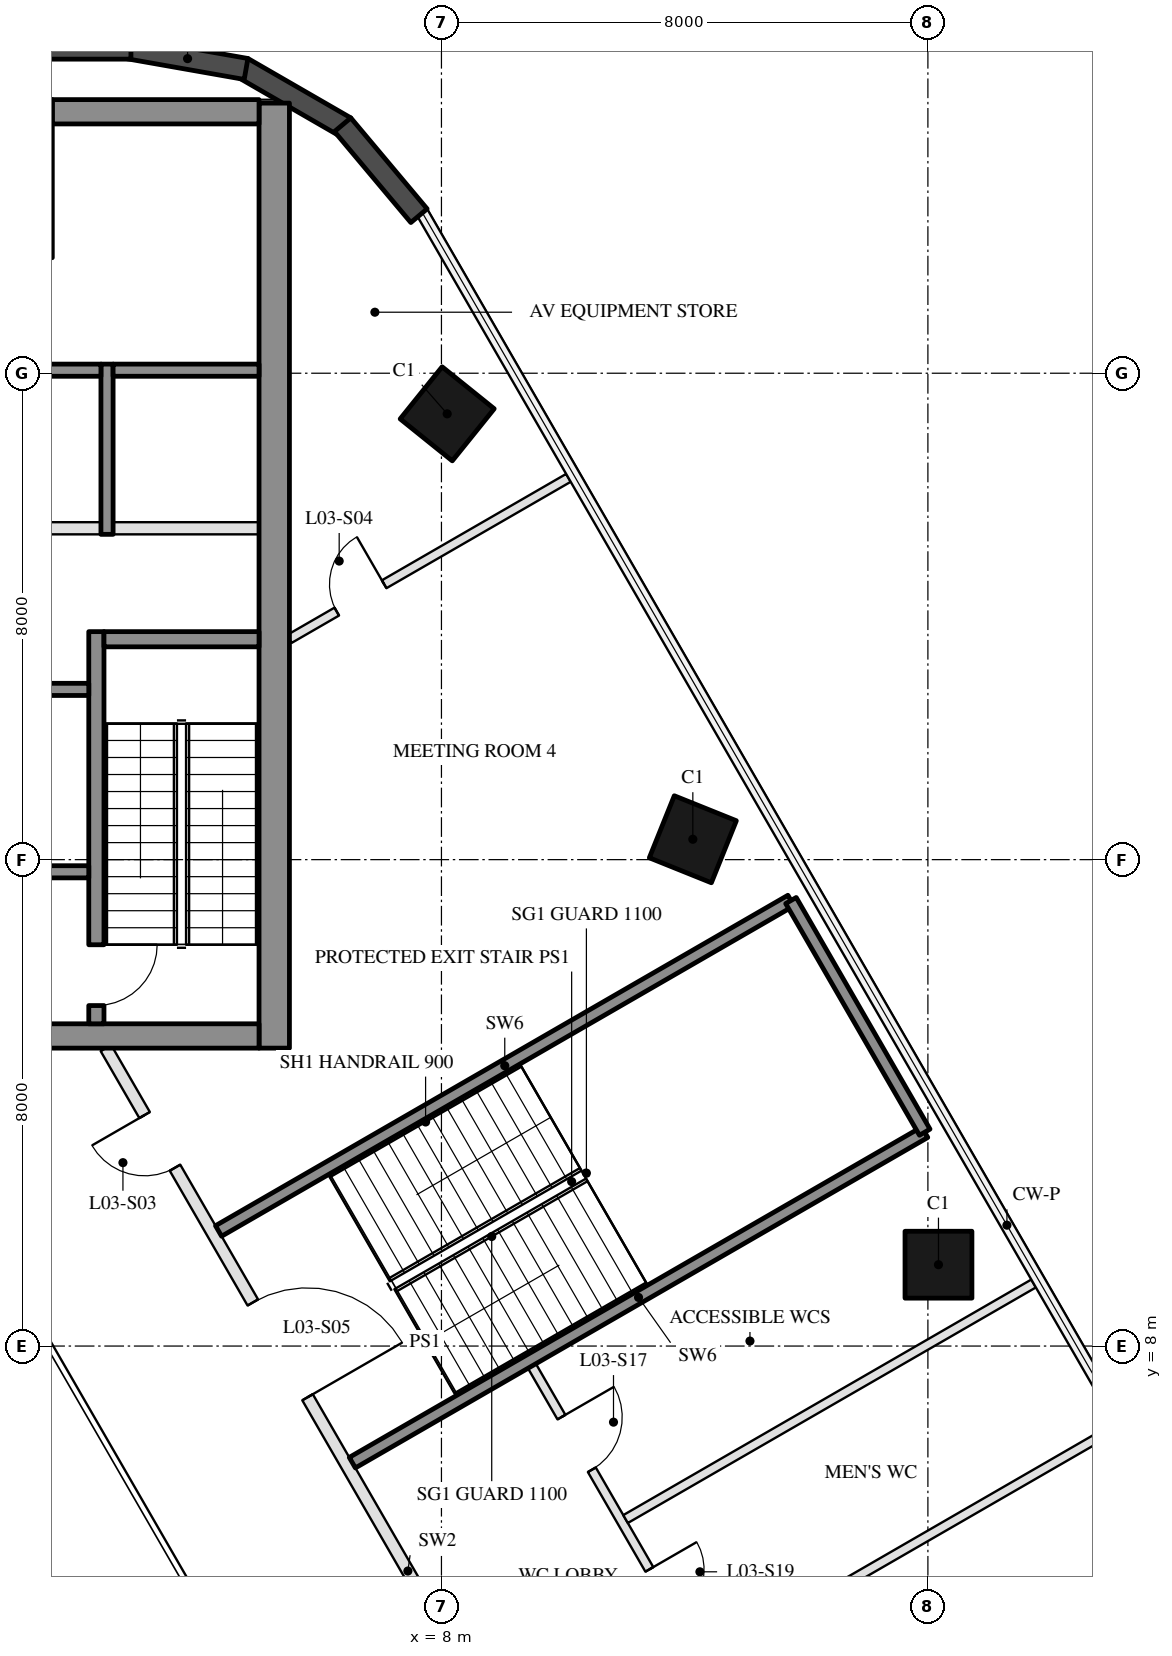
"""IFC4 building model, lengths in metres.
Left out: names, types, materials, properties, quantities, classifications, styles, units other than length and angle.
Written with IfcOpenShell. Run it as: python <this file> out.ifc"""

import sys

from ifc_helpers import new_model, si_unit, direction, frame, frame_2d, origin, origin_2d, place, context, subcontext, project, spatial, rectangle, hollow_rectangle, extrude, boolean, halfspace, element, fill, save


model = new_model("IFC4")
c1 = context("Model", 3, precision=1e-05, world=origin(), true_north=direction((0.0, 1.0)))
c2 = subcontext(c1, "Body", "Model", "MODEL_VIEW")
j1 = project(units=[si_unit("LENGTHUNIT", "METRE"), si_unit("PLANEANGLEUNIT", "RADIAN")], contexts=[c1])
p1 = place(None, origin())
s1 = spatial("IfcSite", under=j1, at=p1, CompositionType="ELEMENT")
p2 = place(p1, origin())
s2 = spatial("IfcBuilding", under=s1, at=p2, CompositionType="ELEMENT")
p3 = place(p2, frame((0.0, 0.0, 23.5)))
s3 = spatial("IfcBuildingStorey", under=s2, at=p3, CompositionType="ELEMENT", Elevation=23.5)
p4 = place(p3, frame((16.174, 9.338, 0.0), z_axis=(-0.045250647617, -0.026087388443, 0.99863498189), x_axis=(0.499528531793, -0.866297435009, 4.558094e-06)))
e1 = element("IfcColumn", 1, at=p4, inside=s3, PredefinedType="COLUMN", context=c2, shape_type="SweptSolid", body=[
    boolean("DIFFERENCE", boolean("DIFFERENCE", extrude(hollow_rectangle(XDim=1.1, YDim=1.1, WallThickness=0.05, at=origin_2d()), origin(), (0.0, 0.0, 1.0), 5.007), halfspace(frame((0.0, 0.0, 0.013), z_axis=(0.0, 0.0, 1.0), x_axis=(1.0, 0.0, 0.0)), True)), halfspace(frame((0.0, 0.0, 4.996), z_axis=(0.0, 0.0, 1.0), x_axis=(1.0, 0.0, 0.0)), False)),
])
p5 = place(p3, frame((12.134, 16.335, 0.0), z_axis=(-0.034759119107, -0.04436297109, 0.998410602125), x_axis=(-0.500316360293, 0.865586931558, 0.021042897599)))
e2 = element("IfcColumn", 2, at=p5, inside=s3, PredefinedType="COLUMN", context=c2, shape_type="SweptSolid", body=[
    boolean("DIFFERENCE", boolean("DIFFERENCE", extrude(hollow_rectangle(XDim=1.1, YDim=1.1, WallThickness=0.05, at=origin_2d()), origin(), (0.0, 0.0, 1.0), 5.008), halfspace(frame((0.0, 0.0, 0.014), z_axis=(0.0, 0.0, 1.0), x_axis=(1.0, 0.0, 0.0)), True)), halfspace(frame((0.0, 0.0, 4.997), z_axis=(0.0, 0.0, 1.0), x_axis=(1.0, 0.0, 0.0)), False)),
])
p6 = place(p3, frame((8.094, 23.332, 0.0), z_axis=(-0.024212996995, -0.062505583791, 0.997750862075), x_axis=(-0.500357699692, 0.864797842793, 0.042034074978)))
e3 = element("IfcColumn", 3, at=p6, inside=s3, PredefinedType="COLUMN", context=c2, shape_type="SweptSolid", body=[
    boolean("DIFFERENCE", boolean("DIFFERENCE", extrude(hollow_rectangle(XDim=1.1, YDim=1.1, WallThickness=0.05, at=origin_2d()), origin(), (0.0, 0.0, 1.0), 5.011), halfspace(frame((0.0, 0.0, 0.017), z_axis=(0.0, 0.0, 1.0), x_axis=(1.0, 0.0, 0.0)), True)), halfspace(frame((0.0, 0.0, 4.999), z_axis=(0.0, 0.0, 1.0), x_axis=(1.0, 0.0, 0.0)), False)),
])
p7 = place(p3, frame((0.0, 27.2, 0.0), z_axis=(0.0, 0.0, 1.0), x_axis=(1.0, 0.0, 0.0)))
e4 = element("IfcColumn", 4, at=p7, inside=s3, PredefinedType="COLUMN", context=c2, shape_type="SweptSolid", body=[
    extrude(hollow_rectangle(XDim=3.2, YDim=2.6, WallThickness=0.08, at=origin_2d()), origin(), (0.0, 0.0, 1.0), 5.0),
])
p8 = place(p3, frame((6.421, 28.048, 0.0), z_axis=(0.0, 0.0, 1.0), x_axis=(-0.866027425724, 0.499996497882, 0.0)))
e5 = element("IfcWall", 5, at=p8, inside=s3, PredefinedType="SOLIDWALL", context=c2, shape_type="SweptSolid", body=[
    extrude(rectangle(XDim=1.954, YDim=0.35, at=frame_2d((0.977, 0.0))), origin(), (0.0, 0.0, 1.0), 4.7),
])
p9 = place(p3, frame((4.787, 29.004, 0.0), z_axis=(0.0, 0.0, 1.0), x_axis=(-0.98479990812, 0.173692662389, 0.0)))
e6 = element("IfcWall", 6, at=p9, inside=s3, PredefinedType="SOLIDWALL", context=c2, shape_type="SweptSolid", body=[
    extrude(rectangle(XDim=1.954, YDim=0.35, at=frame_2d((0.977, 0.0))), origin(), (0.0, 0.0, 1.0), 4.7),
])
p10 = place(p3, frame((2.893, 29.341, 0.0), z_axis=(0.0, 0.0, 1.0), x_axis=(-1.0, 0.0, 0.0)))
e7 = element("IfcWall", 7, at=p10, inside=s3, PredefinedType="SOLIDWALL", context=c2, shape_type="SweptSolid", body=[
    extrude(rectangle(XDim=5.787, YDim=0.35, at=frame_2d((2.893, 0.0))), origin(), (0.0, 0.0, 1.0), 4.7),
])
p11 = place(p3, frame((7.631, 26.591, 0.0), z_axis=(0.0, 0.0, 1.0), x_axis=(-0.642799224464, 0.766034697013, 0.0)))
e8 = element("IfcWall", 8, at=p11, inside=s3, PredefinedType="SOLIDWALL", context=c2, shape_type="SweptSolid", body=[
    extrude(rectangle(XDim=1.953, YDim=0.35, at=frame_2d((0.977, 0.0))), origin(), (0.0, 0.0, 1.0), 4.7),
])
p12 = place(p3, frame((5.25, 12.9, 0.0), z_axis=(0.0, 0.0, 1.0), x_axis=(0.0, 1.0, 0.0)))
e9 = element("IfcWall", 9, at=p12, inside=s3, PredefinedType="SHEAR", context=c2, shape_type="SweptSolid", body=[
    extrude(rectangle(XDim=15.542, YDim=0.5, at=frame_2d((7.771, 0.0))), origin(), (0.0, 0.0, 1.0), 4.7),
])
p13 = place(p3, frame((5.0, 13.1, 0.0), z_axis=(0.0, 0.0, 1.0), x_axis=(-1.0, 0.0, 0.0)))
e10 = element("IfcWall", 10, at=p13, inside=s3, PredefinedType="SHEAR", context=c2, shape_type="SweptSolid", body=[
    extrude(rectangle(XDim=10.0, YDim=0.4, at=frame_2d((5.0, 0.0))), origin(), (0.0, 0.0, 1.0), 4.7),
])
p14 = place(p13, frame((3.55, 0.0, 0.0)))
e11 = element("IfcOpeningElement", 11, at=p14, cuts=e10, PredefinedType="OPENING", context=c2, shape_type="SweptSolid", body=[
    extrude(rectangle(XDim=1.1, YDim=2.1, at=frame_2d((0.55, 1.05))), frame((0.0, 0.21, 0.0), z_axis=(0.0, -1.0, 0.0), x_axis=(1.0, 0.0, 0.0)), (0.0, 0.0, 1.0), 0.42),
])
p15 = place(p13, frame((5.85, 0.0, 0.0)))
e12 = element("IfcOpeningElement", 12, at=p15, cuts=e10, PredefinedType="OPENING", context=c2, shape_type="SweptSolid", body=[
    extrude(rectangle(XDim=1.4, YDim=2.1, at=frame_2d((0.7, 1.05))), frame((0.0, 0.21, 0.0), z_axis=(0.0, -1.0, 0.0), x_axis=(1.0, 0.0, 0.0)), (0.0, 0.0, 1.0), 0.42),
])
p16 = place(p3, frame((5.0, 28.3, 0.0), z_axis=(0.0, 0.0, 1.0), x_axis=(-1.0, 0.0, 0.0)))
e13 = element("IfcWall", 13, at=p16, inside=s3, PredefinedType="SHEAR", context=c2, shape_type="SweptSolid", body=[
    extrude(rectangle(XDim=3.4, YDim=0.4, at=frame_2d((1.7, 0.0))), origin(), (0.0, 0.0, 1.0), 4.7),
])
p17 = place(p3, frame((2.325, 13.3, 0.0), z_axis=(0.0, 0.0, 1.0), x_axis=(0.0, 1.0, 0.0)))
e14 = element("IfcWall", 14, at=p17, inside=s3, PredefinedType="SHEAR", context=c2, shape_type="SweptSolid", body=[
    extrude(rectangle(XDim=6.45, YDim=0.25, at=frame_2d((3.225, 0.0))), origin(), (0.0, 0.0, 1.0), 4.7),
])
p18 = place(p17, frame((0.3, 0.0, 0.0)))
e15 = element("IfcOpeningElement", 15, at=p18, cuts=e14, PredefinedType="OPENING", context=c2, shape_type="SweptSolid", body=[
    extrude(rectangle(XDim=1.0, YDim=2.1, at=frame_2d((0.5, 1.05))), frame((0.0, 0.135, 0.0), z_axis=(0.0, -1.0, 0.0), x_axis=(1.0, 0.0, 0.0)), (0.0, 0.0, 1.0), 0.27),
])
p19 = place(p3, frame((5.0, 19.625, 0.0), z_axis=(0.0, 0.0, 1.0), x_axis=(-1.0, 0.0, 0.0)))
e16 = element("IfcWall", 16, at=p19, inside=s3, PredefinedType="SHEAR", context=c2, shape_type="SweptSolid", body=[
    extrude(rectangle(XDim=2.55, YDim=0.25, at=frame_2d((1.275, 0.0))), origin(), (0.0, 0.0, 1.0), 4.7),
])
p20 = place(p3, frame((2.2, 18.8, 0.0), z_axis=(0.0, 0.0, 1.0), x_axis=(-1.0, 0.0, 0.0)))
e17 = element("IfcWall", 17, at=p20, inside=s3, PredefinedType="SHEAR", context=c2, shape_type="SweptSolid", body=[
    extrude(rectangle(XDim=2.8, YDim=0.2, at=frame_2d((1.4, 0.0))), origin(), (0.0, 0.0, 1.0), 4.7),
])
p21 = place(p3, frame((2.2, 15.8, 0.0), z_axis=(0.0, 0.0, 1.0), x_axis=(-1.0, 0.0, 0.0)))
e18 = element("IfcWall", 18, at=p21, inside=s3, PredefinedType="SHEAR", context=c2, shape_type="SweptSolid", body=[
    extrude(rectangle(XDim=2.8, YDim=0.2, at=frame_2d((1.4, 0.0))), origin(), (0.0, 0.0, 1.0), 4.7),
])
p22 = place(p21, frame((0.7, 0.0, 0.0)))
e19 = element("IfcOpeningElement", 19, at=p22, cuts=e18, PredefinedType="OPENING", context=c2, shape_type="SweptSolid", body=[
    extrude(rectangle(XDim=1.2, YDim=2.1, at=frame_2d((0.6, 1.05))), frame((0.0, 0.11, 0.0), z_axis=(0.0, -1.0, 0.0), x_axis=(1.0, 0.0, 0.0)), (0.0, 0.0, 1.0), 0.22),
])
p23 = place(p3, frame((2.5, 21.35, 0.0), z_axis=(0.0, 0.0, 1.0), x_axis=(0.0, 1.0, 0.0)))
e20 = element("IfcWall", 20, at=p23, inside=s3, PredefinedType="SHEAR", context=c2, shape_type="SweptSolid", body=[
    extrude(rectangle(XDim=2.8, YDim=0.2, at=frame_2d((1.4, 0.0))), origin(), (0.0, 0.0, 1.0), 4.7),
])
p24 = place(p3, frame((5.0, 24.05, 0.0), z_axis=(0.0, 0.0, 1.0), x_axis=(-1.0, 0.0, 0.0)))
e21 = element("IfcWall", 21, at=p24, inside=s3, PredefinedType="SHEAR", context=c2, shape_type="SweptSolid", body=[
    extrude(rectangle(XDim=2.4, YDim=0.2, at=frame_2d((1.2, 0.0))), origin(), (0.0, 0.0, 1.0), 4.7),
])
p25 = place(p3, frame((2.4, 24.05, 0.0), z_axis=(0.0, 0.0, 1.0), x_axis=(-1.0, 0.0, 0.0)))
e22 = element("IfcWall", 22, at=p25, inside=s3, PredefinedType="SHEAR", context=c2, shape_type="SweptSolid", body=[
    extrude(rectangle(XDim=2.8, YDim=0.2, at=frame_2d((1.4, 0.0))), origin(), (0.0, 0.0, 1.0), 4.7),
])
p26 = place(p3, frame((5.0, 21.45, 0.0), z_axis=(0.0, 0.0, 1.0), x_axis=(-1.0, 0.0, 0.0)))
e23 = element("IfcWall", 23, at=p26, inside=s3, PredefinedType="PARTITIONING", context=c2, shape_type="SweptSolid", body=[
    extrude(rectangle(XDim=2.4, YDim=0.2, at=frame_2d((1.2, 0.0))), origin(), (0.0, 0.0, 1.0), 4.7),
])
p27 = place(p3, frame((2.4, 21.45, 0.0), z_axis=(0.0, 0.0, 1.0), x_axis=(-1.0, 0.0, 0.0)))
e24 = element("IfcWall", 24, at=p27, inside=s3, PredefinedType="PARTITIONING", context=c2, shape_type="SweptSolid", body=[
    extrude(rectangle(XDim=2.8, YDim=0.2, at=frame_2d((1.4, 0.0))), origin(), (0.0, 0.0, 1.0), 4.7),
])
p28 = place(p3, frame((13.65, 0.462, 0.0), z_axis=(0.0, 0.0, 1.0), x_axis=(-0.499983926186, 0.866034683806, 0.0)))
e25 = element("IfcWall", 25, at=p28, inside=s3, PredefinedType="PARTITIONING", context=c2, shape_type="SweptSolid", body=[
    extrude(rectangle(XDim=8.325, YDim=0.15, at=frame_2d((4.163, 0.0))), origin(), (0.0, 0.0, 1.0), 3.91),
])
p29 = place(p28, frame((6.354, 0.0, 0.0)))
e26 = element("IfcOpeningElement", 26, at=p29, cuts=e25, PredefinedType="OPENING", context=c2, shape_type="SweptSolid", body=[
    extrude(rectangle(XDim=1.0, YDim=2.1, at=frame_2d((0.5, 1.05))), frame((0.0, 0.085, 0.0), z_axis=(0.0, -1.0, 0.0), x_axis=(1.0, 0.0, 0.0)), (0.0, 0.0, 1.0), 0.17),
])
p30 = place(p28, frame((3.562, 0.0, 0.0)))
e27 = element("IfcOpeningElement", 27, at=p30, cuts=e25, PredefinedType="OPENING", context=c2, shape_type="SweptSolid", body=[
    extrude(rectangle(XDim=0.9, YDim=2.1, at=frame_2d((0.45, 1.05))), frame((0.0, 0.085, 0.0), z_axis=(0.0, -1.0, 0.0), x_axis=(1.0, 0.0, 0.0)), (0.0, 0.0, 1.0), 0.17),
])
p31 = place(p28, frame((0.871, 0.0, 0.0)))
e28 = element("IfcOpeningElement", 28, at=p31, cuts=e25, PredefinedType="OPENING", context=c2, shape_type="SweptSolid", body=[
    extrude(rectangle(XDim=0.9, YDim=2.1, at=frame_2d((0.45, 1.05))), frame((0.0, 0.085, 0.0), z_axis=(0.0, -1.0, 0.0), x_axis=(1.0, 0.0, 0.0)), (0.0, 0.0, 1.0), 0.17),
])
p32 = place(p3, frame((20.463, 4.309, 0.0), z_axis=(0.0, 0.0, 1.0), x_axis=(-0.866020428917, -0.500008616625, 0.0)))
e29 = element("IfcWall", 29, at=p32, inside=s3, PredefinedType="PARTITIONING", context=c2, shape_type="SweptSolid", body=[
    extrude(rectangle(XDim=11.176, YDim=0.15, at=frame_2d((5.588, 0.0))), origin(), (0.0, 0.0, 1.0), 4.1),
])
p33 = place(p3, frame((19.101, 6.669, 0.0), z_axis=(0.0, 0.0, 1.0), x_axis=(-0.866031845665, -0.499988842169, 0.0)))
e30 = element("IfcWall", 30, at=p33, inside=s3, PredefinedType="PARTITIONING", context=c2, shape_type="SweptSolid", body=[
    extrude(rectangle(XDim=7.748, YDim=0.15, at=frame_2d((3.874, 0.0))), origin(), (0.0, 0.0, 1.0), 3.91),
])
p34 = place(p3, frame((17.738, 9.029, 0.0), z_axis=(0.0, 0.0, 1.0), x_axis=(-0.866010323949, -0.500026118132, 0.0)))
e31 = element("IfcWall", 31, at=p34, inside=s3, PredefinedType="PARTITIONING", context=c2, shape_type="SweptSolid", body=[
    extrude(rectangle(XDim=7.748, YDim=0.15, at=frame_2d((3.874, 0.0))), origin(), (0.0, 0.0, 1.0), 4.1),
])
for number, where, z_axis, x_axis in (
    (32, (15.948, 11.517, 0.0), (0.0, 0.0, 1.0), (-0.866, -0.5, 0.0)),
    (33, (13.748, 15.328, 0.0), (0.0, 0.0, 1.0), (-0.866, -0.5, 0.0)),
):
    element("IfcWall", number, at=place(p3, frame(where, z_axis=z_axis, x_axis=x_axis)), inside=s3, PredefinedType="SOLIDWALL", context=c2, shape_type="SweptSolid", body=[
        extrude(rectangle(XDim=10.87, YDim=0.2, at=frame_2d((5.435, 0.0))), origin(), (0.0, 0.0, 1.0), 4.7),
    ])
p35 = place(p3, frame((10.088, 22.279, 0.0), z_axis=(0.0, 0.0, 1.0), x_axis=(-0.866028269386, -0.4999950366, 0.0)))
e34 = element("IfcWall", 34, at=p35, inside=s3, PredefinedType="PARTITIONING", context=c2, shape_type="SweptSolid", body=[
    extrude(rectangle(XDim=5.298, YDim=0.15, at=frame_2d((2.649, 0.0))), origin(), (0.0, 0.0, 1.0), 4.1),
])
p36 = place(p35, frame((3.499, 0.0, 0.0)))
e35 = element("IfcOpeningElement", 35, at=p36, cuts=e34, PredefinedType="OPENING", context=c2, shape_type="SweptSolid", body=[
    extrude(rectangle(XDim=0.9, YDim=2.1, at=frame_2d((0.45, 1.05))), frame((0.0, 0.085, 0.0), z_axis=(0.0, -1.0, 0.0), x_axis=(1.0, 0.0, 0.0)), (0.0, 0.0, 1.0), 0.17),
])
p37 = place(p3, frame((12.413, -4.3, 0.0), z_axis=(0.0, 0.0, 1.0), x_axis=(-0.50000478328, 0.866022642139, 0.0)))
e36 = element("IfcWall", 36, at=p37, inside=s3, PredefinedType="PARTITIONING", context=c2, shape_type="SweptSolid", body=[
    extrude(rectangle(XDim=19.861, YDim=0.2, at=frame_2d((9.931, 0.0))), origin(), (0.0, 0.0, 1.0), 3.91),
])
p38 = place(p37, frame((1.134, 0.0, 0.0)))
e37 = element("IfcOpeningElement", 37, at=p38, cuts=e36, PredefinedType="OPENING", context=c2, shape_type="SweptSolid", body=[
    extrude(rectangle(XDim=1.8, YDim=2.4, at=frame_2d((0.9, 1.2))), frame((0.0, 0.11, 0.0), z_axis=(0.0, -1.0, 0.0), x_axis=(1.0, 0.0, 0.0)), (0.0, 0.0, 1.0), 0.22),
])
p39 = place(p37, frame((17.59, 0.0, 0.0)))
e38 = element("IfcOpeningElement", 38, at=p39, cuts=e36, PredefinedType="OPENING", context=c2, shape_type="SweptSolid", body=[
    extrude(rectangle(XDim=1.0, YDim=2.1, at=frame_2d((0.5, 1.05))), frame((0.0, 0.11, 0.0), z_axis=(0.0, -1.0, 0.0), x_axis=(1.0, 0.0, 0.0)), (0.0, 0.0, 1.0), 0.22),
])
p40 = place(p37, frame((13.23, 0.0, 0.0)))
e39 = element("IfcOpeningElement", 39, at=p40, cuts=e36, PredefinedType="OPENING", context=c2, shape_type="SweptSolid", body=[
    extrude(rectangle(XDim=1.8, YDim=2.1, at=frame_2d((0.9, 1.05))), frame((0.0, 0.11, 0.0), z_axis=(0.0, -1.0, 0.0), x_axis=(1.0, 0.0, 0.0)), (0.0, 0.0, 1.0), 0.22),
])
p41 = place(p37, frame((7.168, 0.0, 0.0)))
e40 = element("IfcOpeningElement", 40, at=p41, cuts=e36, PredefinedType="OPENING", context=c2, shape_type="SweptSolid", body=[
    extrude(rectangle(XDim=1.0, YDim=2.1, at=frame_2d((0.5, 1.05))), frame((0.0, 0.11, 0.0), z_axis=(0.0, -1.0, 0.0), x_axis=(1.0, 0.0, 0.0)), (0.0, 0.0, 1.0), 0.22),
])
p42 = place(p3, frame((15.948, 11.517, 0.0), z_axis=(0.0, 0.0, 1.0), x_axis=(-0.499988222896, 0.866032203192, 0.0)))
e41 = element("IfcWall", 41, at=p42, inside=s3, PredefinedType="SOLIDWALL", context=c2, shape_type="SweptSolid", body=[
    extrude(rectangle(XDim=4.4, YDim=0.2, at=frame_2d((2.2, 0.0))), origin(), (0.0, 0.0, 1.0), 4.7),
])
p43 = place(p18, frame((1.0, 0.0, 0.0), z_axis=(0.0, 0.0, 1.0), x_axis=(-1.0, 0.0, 0.0)))
e42 = element("IfcDoor", 42, at=p43, inside=s3, OperationType="SINGLE_SWING_LEFT", PredefinedType="DOOR", context=c2, shape_type="SweptSolid", body=[
    extrude(rectangle(XDim=1.0, YDim=2.1, at=frame_2d((0.5, 1.05))), frame((0.0, 0.025, 0.0), z_axis=(0.0, -1.0, 0.0), x_axis=(1.0, 0.0, 0.0)), (0.0, 0.0, 1.0), 0.05),
])
fill(e15, e42)
p44 = place(p39, origin())
e43 = element("IfcDoor", 43, at=p44, inside=s3, OperationType="SINGLE_SWING_RIGHT", PredefinedType="DOOR", context=c2, shape_type="SweptSolid", body=[
    extrude(rectangle(XDim=1.0, YDim=2.1, at=frame_2d((0.5, 1.05))), frame((0.0, 0.025, 0.0), z_axis=(0.0, -1.0, 0.0), x_axis=(1.0, 0.0, 0.0)), (0.0, 0.0, 1.0), 0.05),
])
fill(e38, e43)
p45 = place(p36, frame((0.9, 0.0, 0.0), z_axis=(0.0, 0.0, 1.0), x_axis=(-1.0, 0.0, 0.0)))
e44 = element("IfcDoor", 44, at=p45, inside=s3, OperationType="SINGLE_SWING_RIGHT", PredefinedType="DOOR", context=c2, shape_type="SweptSolid", body=[
    extrude(rectangle(XDim=0.9, YDim=2.1, at=frame_2d((0.45, 1.05))), frame((0.0, 0.025, 0.0), z_axis=(0.0, -1.0, 0.0), x_axis=(1.0, 0.0, 0.0)), (0.0, 0.0, 1.0), 0.05),
])
fill(e35, e44)
p46 = place(p40, frame((1.8, 0.0, 0.0), z_axis=(0.0, 0.0, 1.0), x_axis=(-1.0, 0.0, 0.0)))
e45 = element("IfcDoor", 45, at=p46, inside=s3, OperationType="DOUBLE_DOOR_SINGLE_SWING", PredefinedType="DOOR", context=c2, shape_type="SweptSolid", body=[
    extrude(rectangle(XDim=1.8, YDim=2.1, at=frame_2d((0.9, 1.05))), frame((0.0, 0.025, 0.0), z_axis=(0.0, -1.0, 0.0), x_axis=(1.0, 0.0, 0.0)), (0.0, 0.0, 1.0), 0.05),
])
fill(e39, e45)
p47 = place(p29, frame((1.0, 0.0, 0.0), z_axis=(0.0, 0.0, 1.0), x_axis=(-1.0, 0.0, 0.0)))
e46 = element("IfcDoor", 46, at=p47, inside=s3, OperationType="SINGLE_SWING_LEFT", PredefinedType="DOOR", context=c2, shape_type="SweptSolid", body=[
    extrude(rectangle(XDim=1.0, YDim=2.1, at=frame_2d((0.5, 1.05))), frame((0.0, 0.025, 0.0), z_axis=(0.0, -1.0, 0.0), x_axis=(1.0, 0.0, 0.0)), (0.0, 0.0, 1.0), 0.05),
])
fill(e26, e46)
p48 = place(p30, frame((0.9, 0.0, 0.0), z_axis=(0.0, 0.0, 1.0), x_axis=(-1.0, 0.0, 0.0)))
e47 = element("IfcDoor", 47, at=p48, inside=s3, OperationType="SINGLE_SWING_LEFT", PredefinedType="DOOR", context=c2, shape_type="SweptSolid", body=[
    extrude(rectangle(XDim=0.9, YDim=2.1, at=frame_2d((0.45, 1.05))), frame((0.0, 0.025, 0.0), z_axis=(0.0, -1.0, 0.0), x_axis=(1.0, 0.0, 0.0)), (0.0, 0.0, 1.0), 0.05),
])
fill(e27, e47)
save(model, sys.argv[1])
